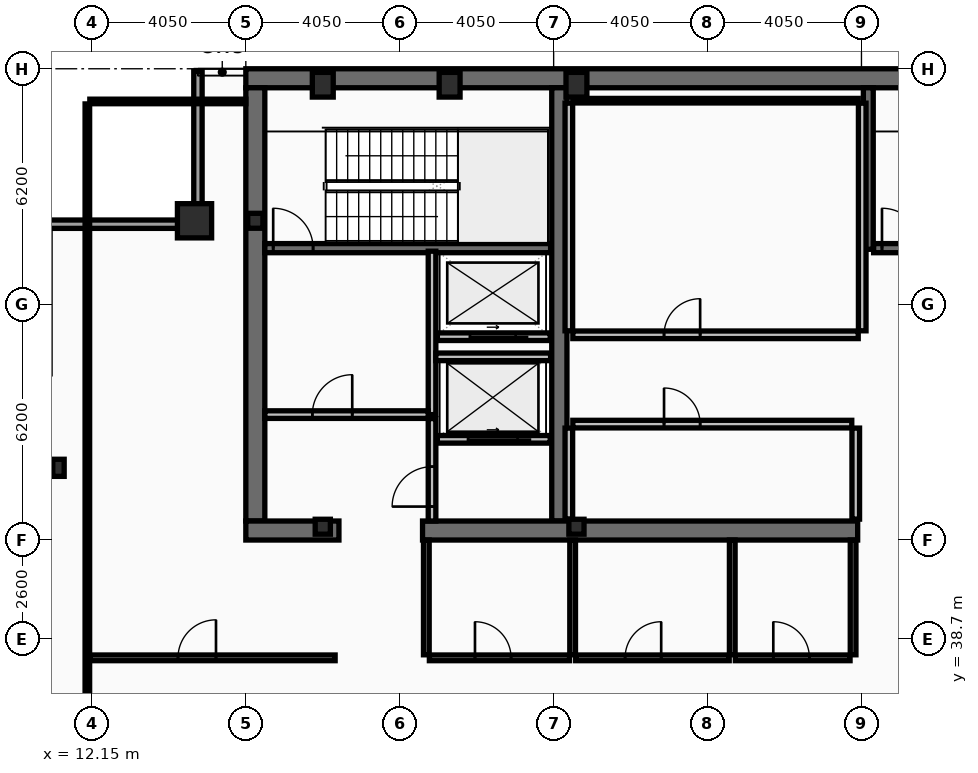
"""IFC4 building model, lengths in metres.
Left out: names, types, materials, properties, quantities, classifications, styles, units other than length and angle.
Written with IfcOpenShell. Run it as: python <this file> out.ifc"""

import sys

from ifc_helpers import new_model, si_unit, direction, frame, frame_2d, origin, origin_2d, place, context, subcontext, project, spatial, rectangle, hollow_rectangle, i_section, extrude, element, fill, save


model = new_model("IFC4")
c1 = context("Model", 3, precision=1e-05, world=origin(), true_north=direction((0.0, 1.0)))
c2 = subcontext(c1, "Body", "Model", "MODEL_VIEW")
j1 = project(units=[si_unit("LENGTHUNIT", "METRE"), si_unit("PLANEANGLEUNIT", "RADIAN")], contexts=[c1])
p1 = place(None, origin())
s1 = spatial("IfcSite", under=j1, at=p1, CompositionType="ELEMENT")
p2 = place(p1, origin())
s2 = spatial("IfcBuilding", under=s1, at=p2, CompositionType="ELEMENT")
p3 = place(p2, frame((0.0, 0.0, 305.8)))
s3 = spatial("IfcBuildingStorey", under=s2, at=p3, CompositionType="ELEMENT", Elevation=305.8)
p4 = place(p3, frame((16.2, 53.45, 0.0), z_axis=(0.0, 0.0, 1.0), x_axis=(1.0, 0.0, 0.0)))
e1 = element("IfcWall", 1, at=p4, inside=s3, PredefinedType="SHEAR", context=c2, shape_type="SweptSolid", body=[
    extrude(rectangle(XDim=40.5, YDim=0.5, at=frame_2d((20.25, 0.0))), origin(), (0.0, 0.0, 1.0), 4.24),
])
p5 = place(p3, frame((16.45, 41.8, 0.0), z_axis=(0.0, 0.0, 1.0), x_axis=(0.0, 1.0, 0.0)))
e2 = element("IfcWall", 2, at=p5, inside=s3, PredefinedType="SHEAR", context=c2, shape_type="SweptSolid", body=[
    extrude(rectangle(XDim=11.4, YDim=0.5, at=frame_2d((5.7, 0.0))), origin(), (0.0, 0.0, 1.0), 4.24),
])
p6 = place(p3, frame((24.45, 41.8, 0.0), z_axis=(0.0, 0.0, 1.0), x_axis=(0.0, 1.0, 0.0)))
e3 = element("IfcWall", 3, at=p6, inside=s3, PredefinedType="SHEAR", context=c2, shape_type="SweptSolid", body=[
    extrude(rectangle(XDim=11.4, YDim=0.4, at=frame_2d((5.7, 0.0))), origin(), (0.0, 0.0, 1.0), 4.24),
])
p7 = place(p3, frame((18.65, 41.55, 0.0), z_axis=(0.0, 0.0, 1.0), x_axis=(-1.0, 0.0, 0.0)))
e4 = element("IfcWall", 4, at=p7, inside=s3, PredefinedType="SHEAR", context=c2, shape_type="SweptSolid", body=[
    extrude(rectangle(XDim=2.45, YDim=0.5, at=frame_2d((1.225, 0.0))), origin(), (0.0, 0.0, 1.0), 4.24),
])
p8 = place(p3, frame((32.3, 41.55, 0.0), z_axis=(0.0, 0.0, 1.0), x_axis=(-1.0, 0.0, 0.0)))
e5 = element("IfcWall", 5, at=p8, inside=s3, PredefinedType="SHEAR", context=c2, shape_type="SweptSolid", body=[
    extrude(rectangle(XDim=11.45, YDim=0.5, at=frame_2d((5.725, 0.0))), origin(), (0.0, 0.0, 1.0), 4.24),
])
p9 = place(p3, frame((32.58, 48.95, 0.0), z_axis=(0.0, 0.0, 1.0), x_axis=(0.0, 1.0, 0.0)))
e6 = element("IfcWall", 6, at=p9, inside=s3, PredefinedType="SHEAR", context=c2, shape_type="SweptSolid", body=[
    extrude(rectangle(XDim=4.25, YDim=0.26, at=frame_2d((2.125, 0.0))), origin(), (0.0, 0.0, 1.0), 4.24),
])
p10 = place(p3, frame((16.7, 48.98, 0.0), z_axis=(0.0, 0.0, 1.0), x_axis=(1.0, 0.0, 0.0)))
e7 = element("IfcWall", 7, at=p10, inside=s3, PredefinedType="SHEAR", context=c2, shape_type="SweptSolid", body=[
    extrude(rectangle(XDim=7.52, YDim=0.24, at=frame_2d((3.76, 0.0))), origin(), (0.0, 0.0, 1.0), 4.24),
])
p11 = place(p10, frame((0.22, 0.0, 0.0)))
e8 = element("IfcOpeningElement", 8, at=p11, cuts=e7, PredefinedType="OPENING", context=c2, shape_type="SweptSolid", body=[
    extrude(rectangle(XDim=1.05, YDim=2.15, at=frame_2d((0.525, 1.075))), frame((0.0, 0.13, 0.0), z_axis=(0.0, -1.0, 0.0), x_axis=(1.0, 0.0, 0.0)), (0.0, 0.0, 1.0), 0.26),
])
p12 = place(p3, frame((32.72, 48.98, 0.0), z_axis=(0.0, 0.0, 1.0), x_axis=(1.0, 0.0, 0.0)))
e9 = element("IfcWall", 9, at=p12, inside=s3, PredefinedType="SHEAR", context=c2, shape_type="SweptSolid", body=[
    extrude(rectangle(XDim=7.56, YDim=0.24, at=frame_2d((3.78, 0.0))), origin(), (0.0, 0.0, 1.0), 4.24),
])
p13 = place(p12, frame((0.22, 0.0, 0.0)))
e10 = element("IfcOpeningElement", 10, at=p13, cuts=e9, PredefinedType="OPENING", context=c2, shape_type="SweptSolid", body=[
    extrude(rectangle(XDim=1.05, YDim=2.15, at=frame_2d((0.525, 1.075))), frame((0.0, 0.13, 0.0), z_axis=(0.0, -1.0, 0.0), x_axis=(1.0, 0.0, 0.0)), (0.0, 0.0, 1.0), 0.26),
])
p14 = place(p3, frame((14.85, 49.7, 0.0), z_axis=(0.0, 0.0, 1.0), x_axis=(1.0, 0.0, 0.0)))
e11 = element("IfcColumn", 11, at=p14, inside=s3, PredefinedType="COLUMN", context=c2, shape_type="SweptSolid", body=[
    extrude(hollow_rectangle(XDim=0.9, YDim=0.9, WallThickness=0.05, at=origin_2d()), origin(), (0.0, 0.0, 1.0), 4.4),
])
for number, where, z_axis, x_axis in (
    (12, (18.225, 53.28, 0.0), (0.0, 0.0, 1.0), (1.0, 0.0, 0.0)),
    (13, (21.562, 53.28, 0.0), (0.0, 0.0, 1.0), (1.0, 0.0, 0.0)),
    (14, (24.9, 53.28, 0.0), (0.0, 0.0, 1.0), (1.0, 0.0, 0.0)),
):
    element("IfcColumn", number, at=place(p3, frame(where, z_axis=z_axis, x_axis=x_axis)), inside=s3, PredefinedType="COLUMN", context=c2, shape_type="SweptSolid", body=[
        extrude(hollow_rectangle(XDim=0.55, YDim=0.65, WallThickness=0.04, at=origin_2d()), origin(), (0.0, 0.0, 1.0), 4.4),
    ])
p15 = place(p3, frame((11.27, 43.2, 0.0), z_axis=(0.0, 0.0, 1.0), x_axis=(1.0, 0.0, 0.0)))
e15 = element("IfcColumn", 15, at=p15, inside=s3, PredefinedType="COLUMN", context=c2, shape_type="SweptSolid", body=[
    extrude(i_section(OverallWidth=0.3, OverallDepth=0.45, WebThickness=0.014, FlangeThickness=0.026, at=origin_2d()), origin(), (0.0, 0.0, 1.0), 4.4),
])
for number, where, z_axis, x_axis in (
    (16, (16.45, 49.7, 0.0), (0.0, 0.0, 1.0), (1.0, 0.0, 0.0)),
    (17, (18.225, 41.65, 0.0), (0.0, 0.0, 1.0), (1.0, 0.0, 0.0)),
    (18, (24.9, 41.65, 0.0), (0.0, 0.0, 1.0), (1.0, 0.0, 0.0)),
):
    element("IfcColumn", number, at=place(p3, frame(where, z_axis=z_axis, x_axis=x_axis)), inside=s3, PredefinedType="COLUMN", context=c2, shape_type="SweptSolid", body=[
        extrude(i_section(OverallWidth=0.399, OverallDepth=0.393, WebThickness=0.023, FlangeThickness=0.037, at=origin_2d()), origin(), (0.0, 0.0, 1.0), 4.4),
    ])
p16 = place(p3, frame((10.83, 49.61, 0.0), z_axis=(0.0, 0.0, 1.0), x_axis=(1.0, 0.0, 0.0)))
e19 = element("IfcWall", 19, at=p16, inside=s3, PredefinedType="SOLIDWALL", context=c2, shape_type="SweptSolid", body=[
    extrude(rectangle(XDim=4.22, YDim=0.22, at=frame_2d((2.11, 0.0))), origin(), (0.0, 0.0, 1.0), 3.68),
])
p17 = place(p3, frame((14.94, 49.72, 0.0), z_axis=(0.0, 0.0, 1.0), x_axis=(0.0, 1.0, 0.0)))
e20 = element("IfcWall", 20, at=p17, inside=s3, PredefinedType="SOLIDWALL", context=c2, shape_type="SweptSolid", body=[
    extrude(rectangle(XDim=3.91, YDim=0.22, at=frame_2d((1.955, 0.0))), origin(), (0.0, 0.0, 1.0), 3.68),
])
p18 = place(p3, frame((24.21, 43.95, 0.0), z_axis=(0.0, 0.0, 1.0), x_axis=(-1.0, 0.0, 0.0)))
e21 = element("IfcWall", 21, at=p18, inside=s3, PredefinedType="PARTITIONING", context=c2, shape_type="SweptSolid", body=[
    extrude(rectangle(XDim=2.97, YDim=0.2, at=frame_2d((1.485, 0.0))), origin(), (0.0, 0.0, 1.0), 4.24),
])
p19 = place(p18, frame((0.86, 0.0, 0.0)))
e22 = element("IfcOpeningElement", 22, at=p19, cuts=e21, PredefinedType="OPENING", context=c2, shape_type="SweptSolid", body=[
    extrude(rectangle(XDim=1.3, YDim=2.18, at=frame_2d((0.65, 1.09))), frame((0.0, 0.11, 0.0), z_axis=(0.0, -1.0, 0.0), x_axis=(1.0, 0.0, 0.0)), (0.0, 0.0, 1.0), 0.22),
])
p20 = place(p3, frame((24.21, 46.65, 0.0), z_axis=(0.0, 0.0, 1.0), x_axis=(-1.0, 0.0, 0.0)))
e23 = element("IfcWall", 23, at=p20, inside=s3, PredefinedType="PARTITIONING", context=c2, shape_type="SweptSolid", body=[
    extrude(rectangle(XDim=2.97, YDim=0.2, at=frame_2d((1.485, 0.0))), origin(), (0.0, 0.0, 1.0), 4.24),
])
p21 = place(p20, frame((0.91, 0.0, 0.0)))
e24 = element("IfcOpeningElement", 24, at=p21, cuts=e23, PredefinedType="OPENING", context=c2, shape_type="SweptSolid", body=[
    extrude(rectangle(XDim=1.2, YDim=2.18, at=frame_2d((0.6, 1.09))), frame((0.0, 0.11, 0.0), z_axis=(0.0, -1.0, 0.0), x_axis=(1.0, 0.0, 0.0)), (0.0, 0.0, 1.0), 0.22),
])
p22 = place(p3, frame((21.1, 44.6, 0.0), z_axis=(0.0, 0.0, 1.0), x_axis=(0.0, 1.0, 0.0)))
e25 = element("IfcWall", 25, at=p22, inside=s3, PredefinedType="PARTITIONING", context=c2, shape_type="SweptSolid", body=[
    extrude(rectangle(XDim=4.3, YDim=0.2, at=frame_2d((2.15, 0.0))), origin(), (0.0, 0.0, 1.0), 4.24),
])
p23 = place(p3, frame((16.7, 44.6, 0.0), z_axis=(0.0, 0.0, 1.0), x_axis=(1.0, 0.0, 0.0)))
e26 = element("IfcWall", 26, at=p23, inside=s3, PredefinedType="PARTITIONING", context=c2, shape_type="SweptSolid", body=[
    extrude(rectangle(XDim=4.3, YDim=0.2, at=frame_2d((2.15, 0.0))), origin(), (0.0, 0.0, 1.0), 4.24),
])
p24 = place(p23, frame((1.25, 0.0, 0.0)))
e27 = element("IfcOpeningElement", 27, at=p24, cuts=e26, PredefinedType="OPENING", context=c2, shape_type="SweptSolid", body=[
    extrude(rectangle(XDim=1.05, YDim=2.15, at=frame_2d((0.525, 1.075))), frame((0.0, 0.11, 0.0), z_axis=(0.0, -1.0, 0.0), x_axis=(1.0, 0.0, 0.0)), (0.0, 0.0, 1.0), 0.22),
])
p25 = place(p3, frame((21.2, 46.12, 0.0), z_axis=(0.0, 0.0, 1.0), x_axis=(1.0, 0.0, 0.0)))
e28 = element("IfcWall", 28, at=p25, inside=s3, PredefinedType="PARTITIONING", context=c2, shape_type="SweptSolid", body=[
    extrude(rectangle(XDim=3.02, YDim=0.2, at=frame_2d((1.51, 0.0))), origin(), (0.0, 0.0, 1.0), 4.24),
])
p26 = place(p3, frame((21.1, 41.8, 0.0), z_axis=(0.0, 0.0, 1.0), x_axis=(0.0, 1.0, 0.0)))
e29 = element("IfcWall", 29, at=p26, inside=s3, PredefinedType="PARTITIONING", context=c2, shape_type="SweptSolid", body=[
    extrude(rectangle(XDim=2.695, YDim=0.2, at=frame_2d((1.348, 0.0))), origin(), (0.0, 0.0, 1.0), 4.24),
])
p27 = place(p26, frame((0.38, 0.0, 0.0)))
e30 = element("IfcOpeningElement", 30, at=p27, cuts=e29, PredefinedType="OPENING", context=c2, shape_type="SweptSolid", body=[
    extrude(rectangle(XDim=1.05, YDim=2.15, at=frame_2d((0.525, 1.075))), frame((0.0, 0.11, 0.0), z_axis=(0.0, -1.0, 0.0), x_axis=(1.0, 0.0, 0.0)), (0.0, 0.0, 1.0), 0.22),
])
for number, where, z_axis, x_axis in (
    (31, (24.7, 46.805, 0.0), (0.0, 0.0, 1.0), (0.0, 1.0, 0.0)),
    (32, (32.42, 46.805, 0.0), (0.0, 0.0, 1.0), (0.0, 1.0, 0.0)),
):
    element("IfcWall", number, at=place(p3, frame(where, z_axis=z_axis, x_axis=x_axis)), inside=s3, PredefinedType="PARTITIONING", context=c2, shape_type="SweptSolid", body=[
        extrude(rectangle(XDim=5.99, YDim=0.2, at=frame_2d((2.995, 0.0))), origin(), (0.0, 0.0, 1.0), 4.24),
    ])
p28 = place(p3, frame((24.805, 52.86, 0.0), z_axis=(0.0, 0.0, 1.0), x_axis=(1.0, 0.0, 0.0)))
e33 = element("IfcWall", 33, at=p28, inside=s3, PredefinedType="PARTITIONING", context=c2, shape_type="SweptSolid", body=[
    extrude(rectangle(XDim=7.51, YDim=0.12, at=frame_2d((3.755, 0.0))), origin(), (0.0, 0.0, 1.0), 4.24),
])
p29 = place(p3, frame((24.805, 46.7, 0.0), z_axis=(0.0, 0.0, 1.0), x_axis=(1.0, 0.0, 0.0)))
e34 = element("IfcWall", 34, at=p29, inside=s3, PredefinedType="PARTITIONING", context=c2, shape_type="SweptSolid", body=[
    extrude(rectangle(XDim=7.51, YDim=0.2, at=frame_2d((3.755, 0.0))), origin(), (0.0, 0.0, 1.0), 4.24),
])
p30 = place(p29, frame((2.4, 0.0, 0.0)))
e35 = element("IfcOpeningElement", 35, at=p30, cuts=e34, PredefinedType="OPENING", context=c2, shape_type="SweptSolid", body=[
    extrude(rectangle(XDim=0.95, YDim=2.1, at=frame_2d((0.475, 1.05))), frame((0.0, 0.11, 0.0), z_axis=(0.0, -1.0, 0.0), x_axis=(1.0, 0.0, 0.0)), (0.0, 0.0, 1.0), 0.22),
])
for number, where, z_axis, x_axis in (
    (36, (24.7, 41.85, 0.0), (0.0, 0.0, 1.0), (0.0, 1.0, 0.0)),
    (37, (32.25, 41.85, 0.0), (0.0, 0.0, 1.0), (0.0, 1.0, 0.0)),
):
    element("IfcWall", number, at=place(p3, frame(where, z_axis=z_axis, x_axis=x_axis)), inside=s3, PredefinedType="PARTITIONING", context=c2, shape_type="SweptSolid", body=[
        extrude(rectangle(XDim=2.395, YDim=0.2, at=frame_2d((1.198, 0.0))), origin(), (0.0, 0.0, 1.0), 4.24),
    ])
p31 = place(p3, frame((24.805, 44.35, 0.0), z_axis=(0.0, 0.0, 1.0), x_axis=(1.0, 0.0, 0.0)))
e38 = element("IfcWall", 38, at=p31, inside=s3, PredefinedType="PARTITIONING", context=c2, shape_type="SweptSolid", body=[
    extrude(rectangle(XDim=7.34, YDim=0.2, at=frame_2d((3.67, 0.0))), origin(), (0.0, 0.0, 1.0), 4.24),
])
p32 = place(p31, frame((2.4, 0.0, 0.0)))
e39 = element("IfcOpeningElement", 39, at=p32, cuts=e38, PredefinedType="OPENING", context=c2, shape_type="SweptSolid", body=[
    extrude(rectangle(XDim=0.95, YDim=2.1, at=frame_2d((0.475, 1.05))), frame((0.0, 0.11, 0.0), z_axis=(0.0, -1.0, 0.0), x_axis=(1.0, 0.0, 0.0)), (0.0, 0.0, 1.0), 0.22),
])
p33 = place(p3, frame((21.03, 38.2, 0.0), z_axis=(0.0, 0.0, 1.0), x_axis=(1.0, 0.0, 0.0)))
e40 = element("IfcWall", 40, at=p33, inside=s3, PredefinedType="PARTITIONING", context=c2, shape_type="SweptSolid", body=[
    extrude(rectangle(XDim=3.69, YDim=0.15, at=frame_2d((1.845, 0.0))), origin(), (0.0, 0.0, 1.0), 3.58),
])
p34 = place(p33, frame((1.2, 0.0, 0.0)))
e41 = element("IfcOpeningElement", 41, at=p34, cuts=e40, PredefinedType="OPENING", context=c2, shape_type="SweptSolid", body=[
    extrude(rectangle(XDim=0.95, YDim=2.05, at=frame_2d((0.475, 1.025))), frame((0.0, 0.085, 0.0), z_axis=(0.0, -1.0, 0.0), x_axis=(1.0, 0.0, 0.0)), (0.0, 0.0, 1.0), 0.17),
])
p35 = place(p3, frame((24.88, 38.2, 0.0), z_axis=(0.0, 0.0, 1.0), x_axis=(1.0, 0.0, 0.0)))
e42 = element("IfcWall", 42, at=p35, inside=s3, PredefinedType="PARTITIONING", context=c2, shape_type="SweptSolid", body=[
    extrude(rectangle(XDim=4.04, YDim=0.15, at=frame_2d((2.02, 0.0))), origin(), (0.0, 0.0, 1.0), 3.58),
])
p36 = place(p35, frame((1.3, 0.0, 0.0)))
e43 = element("IfcOpeningElement", 43, at=p36, cuts=e42, PredefinedType="OPENING", context=c2, shape_type="SweptSolid", body=[
    extrude(rectangle(XDim=0.95, YDim=2.05, at=frame_2d((0.475, 1.025))), frame((0.0, 0.085, 0.0), z_axis=(0.0, -1.0, 0.0), x_axis=(1.0, 0.0, 0.0)), (0.0, 0.0, 1.0), 0.17),
])
p37 = place(p3, frame((29.08, 38.2, 0.0), z_axis=(0.0, 0.0, 1.0), x_axis=(1.0, 0.0, 0.0)))
e44 = element("IfcWall", 44, at=p37, inside=s3, PredefinedType="PARTITIONING", context=c2, shape_type="SweptSolid", body=[
    extrude(rectangle(XDim=3.02, YDim=0.15, at=frame_2d((1.51, 0.0))), origin(), (0.0, 0.0, 1.0), 4.24),
])
p38 = place(p37, frame((1.0, 0.0, 0.0)))
e45 = element("IfcOpeningElement", 45, at=p38, cuts=e44, PredefinedType="OPENING", context=c2, shape_type="SweptSolid", body=[
    extrude(rectangle(XDim=0.95, YDim=2.05, at=frame_2d((0.475, 1.025))), frame((0.0, 0.085, 0.0), z_axis=(0.0, -1.0, 0.0), x_axis=(1.0, 0.0, 0.0)), (0.0, 0.0, 1.0), 0.17),
])
p39 = place(p3, frame((20.95, 38.28, 0.0), z_axis=(0.0, 0.0, 1.0), x_axis=(0.0, 1.0, 0.0)))
e46 = element("IfcWall", 46, at=p39, inside=s3, PredefinedType="PARTITIONING", context=c2, shape_type="SweptSolid", body=[
    extrude(rectangle(XDim=3.02, YDim=0.15, at=frame_2d((1.51, 0.0))), origin(), (0.0, 0.0, 1.0), 4.24),
])
p40 = place(p3, frame((24.8, 38.28, 0.0), z_axis=(0.0, 0.0, 1.0), x_axis=(0.0, 1.0, 0.0)))
e47 = element("IfcWall", 47, at=p40, inside=s3, PredefinedType="PARTITIONING", context=c2, shape_type="SweptSolid", body=[
    extrude(rectangle(XDim=3.02, YDim=0.15, at=frame_2d((1.51, 0.0))), origin(), (0.0, 0.0, 1.0), 3.58),
])
for number, where, z_axis, x_axis in (
    (48, (29.0, 38.28, 0.0), (0.0, 0.0, 1.0), (0.0, 1.0, 0.0)),
    (49, (32.18, 38.28, 0.0), (0.0, 0.0, 1.0), (0.0, 1.0, 0.0)),
):
    element("IfcWall", number, at=place(p3, frame(where, z_axis=z_axis, x_axis=x_axis)), inside=s3, PredefinedType="PARTITIONING", context=c2, shape_type="SweptSolid", body=[
        extrude(rectangle(XDim=3.02, YDim=0.15, at=frame_2d((1.51, 0.0))), origin(), (0.0, 0.0, 1.0), 4.24),
    ])
p41 = place(p3, frame((12.095, 38.2, 0.0), z_axis=(0.0, 0.0, 1.0), x_axis=(1.0, 0.0, 0.0)))
e50 = element("IfcWall", 50, at=p41, inside=s3, PredefinedType="PARTITIONING", context=c2, shape_type="SweptSolid", body=[
    extrude(rectangle(XDim=6.455, YDim=0.15, at=frame_2d((3.228, 0.0))), origin(), (0.0, 0.0, 1.0), 3.58),
])
p42 = place(p41, frame((2.32, 0.0, 0.0)))
e51 = element("IfcOpeningElement", 51, at=p42, cuts=e50, PredefinedType="OPENING", context=c2, shape_type="SweptSolid", body=[
    extrude(rectangle(XDim=1.0, YDim=2.05, at=frame_2d((0.5, 1.025))), frame((0.0, 0.085, 0.0), z_axis=(0.0, -1.0, 0.0), x_axis=(1.0, 0.0, 0.0)), (0.0, 0.0, 1.0), 0.17),
])
p43 = place(p3, frame((12.03, 10.665, 0.0), z_axis=(0.0, 0.0, 1.0), x_axis=(0.0, 1.0, 0.0)))
e52 = element("IfcWall", 52, at=p43, inside=s3, PredefinedType="PARTITIONING", context=c2, shape_type="SweptSolid", body=[
    extrude(rectangle(XDim=42.11, YDim=0.12, at=frame_2d((21.055, 0.0))), origin(), (0.0, 0.0, 1.0), 3.58),
])
p44 = place(p3, frame((12.095, 52.84, 0.0), z_axis=(0.0, 0.0, 1.0), x_axis=(1.0, 0.0, 0.0)))
e53 = element("IfcWall", 53, at=p44, inside=s3, PredefinedType="PARTITIONING", context=c2, shape_type="SweptSolid", body=[
    extrude(rectangle(XDim=4.105, YDim=0.12, at=frame_2d((2.052, 0.0))), origin(), (0.0, 0.0, 1.0), 4.24),
])
p45 = place(p11, origin())
e54 = element("IfcDoor", 54, at=p45, inside=s3, OperationType="SINGLE_SWING_LEFT", PredefinedType="DOOR", context=c2, shape_type="SweptSolid", body=[
    extrude(rectangle(XDim=1.05, YDim=2.15, at=frame_2d((0.525, 1.075))), frame((0.0, 0.025, 0.0), z_axis=(0.0, -1.0, 0.0), x_axis=(1.0, 0.0, 0.0)), (0.0, 0.0, 1.0), 0.05),
])
fill(e8, e54)
p46 = place(p13, origin())
e55 = element("IfcDoor", 55, at=p46, inside=s3, OperationType="SINGLE_SWING_LEFT", PredefinedType="DOOR", context=c2, shape_type="SweptSolid", body=[
    extrude(rectangle(XDim=1.05, YDim=2.15, at=frame_2d((0.525, 1.075))), frame((0.0, 0.025, 0.0), z_axis=(0.0, -1.0, 0.0), x_axis=(1.0, 0.0, 0.0)), (0.0, 0.0, 1.0), 0.05),
])
fill(e10, e55)
p47 = place(p19, origin())
e56 = element("IfcDoor", 56, at=p47, inside=s3, OperationType="SLIDING_TO_LEFT", PredefinedType="DOOR", context=c2, shape_type="SweptSolid", body=[
    extrude(rectangle(XDim=1.3, YDim=2.18, at=frame_2d((0.65, 1.09))), frame((0.0, 0.025, 0.0), z_axis=(0.0, -1.0, 0.0), x_axis=(1.0, 0.0, 0.0)), (0.0, 0.0, 1.0), 0.05),
])
fill(e22, e56)
p48 = place(p21, origin())
e57 = element("IfcDoor", 57, at=p48, inside=s3, OperationType="SLIDING_TO_LEFT", PredefinedType="DOOR", context=c2, shape_type="SweptSolid", body=[
    extrude(rectangle(XDim=1.2, YDim=2.18, at=frame_2d((0.6, 1.09))), frame((0.0, 0.025, 0.0), z_axis=(0.0, -1.0, 0.0), x_axis=(1.0, 0.0, 0.0)), (0.0, 0.0, 1.0), 0.05),
])
fill(e24, e57)
p49 = place(p24, origin())
e58 = element("IfcDoor", 58, at=p49, inside=s3, OperationType="SINGLE_SWING_RIGHT", PredefinedType="DOOR", context=c2, shape_type="SweptSolid", body=[
    extrude(rectangle(XDim=1.05, YDim=2.15, at=frame_2d((0.525, 1.075))), frame((0.0, 0.025, 0.0), z_axis=(0.0, -1.0, 0.0), x_axis=(1.0, 0.0, 0.0)), (0.0, 0.0, 1.0), 0.05),
])
fill(e27, e58)
p50 = place(p27, origin())
e59 = element("IfcDoor", 59, at=p50, inside=s3, OperationType="SINGLE_SWING_LEFT", PredefinedType="DOOR", context=c2, shape_type="SweptSolid", body=[
    extrude(rectangle(XDim=1.05, YDim=2.15, at=frame_2d((0.525, 1.075))), frame((0.0, 0.025, 0.0), z_axis=(0.0, -1.0, 0.0), x_axis=(1.0, 0.0, 0.0)), (0.0, 0.0, 1.0), 0.05),
])
fill(e30, e59)
p51 = place(p30, origin())
e60 = element("IfcDoor", 60, at=p51, inside=s3, OperationType="SINGLE_SWING_RIGHT", PredefinedType="DOOR", context=c2, shape_type="SweptSolid", body=[
    extrude(rectangle(XDim=0.95, YDim=2.1, at=frame_2d((0.475, 1.05))), frame((0.0, 0.025, 0.0), z_axis=(0.0, -1.0, 0.0), x_axis=(1.0, 0.0, 0.0)), (0.0, 0.0, 1.0), 0.05),
])
fill(e35, e60)
p52 = place(p32, origin())
e61 = element("IfcDoor", 61, at=p52, inside=s3, OperationType="SINGLE_SWING_LEFT", PredefinedType="DOOR", context=c2, shape_type="SweptSolid", body=[
    extrude(rectangle(XDim=0.95, YDim=2.1, at=frame_2d((0.475, 1.05))), frame((0.0, 0.025, 0.0), z_axis=(0.0, -1.0, 0.0), x_axis=(1.0, 0.0, 0.0)), (0.0, 0.0, 1.0), 0.05),
])
fill(e39, e61)
p53 = place(p34, origin())
e62 = element("IfcDoor", 62, at=p53, inside=s3, OperationType="SINGLE_SWING_LEFT", PredefinedType="DOOR", context=c2, shape_type="SweptSolid", body=[
    extrude(rectangle(XDim=0.95, YDim=2.05, at=frame_2d((0.475, 1.025))), frame((0.0, 0.025, 0.0), z_axis=(0.0, -1.0, 0.0), x_axis=(1.0, 0.0, 0.0)), (0.0, 0.0, 1.0), 0.05),
])
fill(e41, e62)
p54 = place(p36, origin())
e63 = element("IfcDoor", 63, at=p54, inside=s3, OperationType="SINGLE_SWING_RIGHT", PredefinedType="DOOR", context=c2, shape_type="SweptSolid", body=[
    extrude(rectangle(XDim=0.95, YDim=2.05, at=frame_2d((0.475, 1.025))), frame((0.0, 0.025, 0.0), z_axis=(0.0, -1.0, 0.0), x_axis=(1.0, 0.0, 0.0)), (0.0, 0.0, 1.0), 0.05),
])
fill(e43, e63)
p55 = place(p38, origin())
e64 = element("IfcDoor", 64, at=p55, inside=s3, OperationType="SINGLE_SWING_LEFT", PredefinedType="DOOR", context=c2, shape_type="SweptSolid", body=[
    extrude(rectangle(XDim=0.95, YDim=2.05, at=frame_2d((0.475, 1.025))), frame((0.0, 0.025, 0.0), z_axis=(0.0, -1.0, 0.0), x_axis=(1.0, 0.0, 0.0)), (0.0, 0.0, 1.0), 0.05),
])
fill(e45, e64)
p56 = place(p42, origin())
e65 = element("IfcDoor", 65, at=p56, inside=s3, OperationType="SINGLE_SWING_RIGHT", PredefinedType="DOOR", context=c2, shape_type="SweptSolid", body=[
    extrude(rectangle(XDim=1.0, YDim=2.05, at=frame_2d((0.5, 1.025))), frame((0.0, 0.025, 0.0), z_axis=(0.0, -1.0, 0.0), x_axis=(1.0, 0.0, 0.0)), (0.0, 0.0, 1.0), 0.05),
])
fill(e51, e65)
save(model, sys.argv[1])
